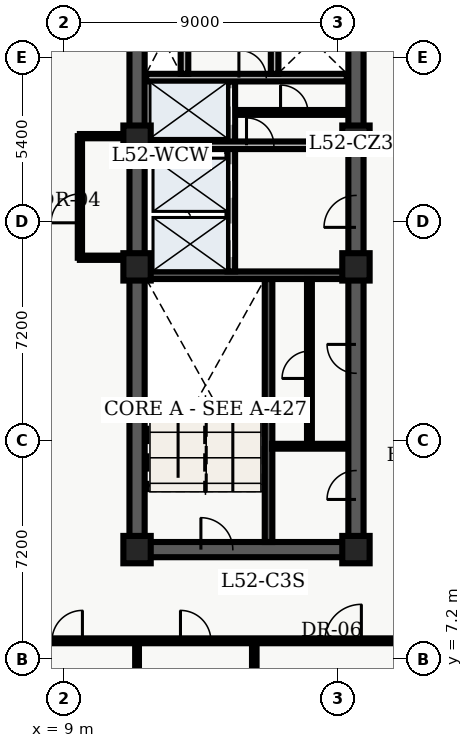
"""IFC4 building model, lengths in metres.
Left out: names, types, materials, properties, quantities, classifications, styles, units other than length and angle.
Written with IfcOpenShell. Run it as: python <this file> out.ifc"""

import sys

from ifc_helpers import new_model, entity, si_unit, converted_unit, direction, frame, origin_with_axes, origin_2d_with_axis, place, context, subcontext, project, spatial, polyline, rectangle, outline, extrude, element, fill, save


model = new_model("IFC4")
c1 = context("Model", 3, precision=1e-05, world=origin_with_axes(), true_north=direction((0.0, 1.0)))
c2 = subcontext(c1, "Body", "Model", "MODEL_VIEW")
j1 = project(units=[si_unit("LENGTHUNIT", "METRE"), converted_unit("PLANEANGLEUNIT", "DEGREE", entity("IfcPlaneAngleMeasure", 0.017), si_unit("PLANEANGLEUNIT", "RADIAN"), dimensions=[0, 0, 0, 0, 0, 0, 0])], contexts=[c1])
p1 = place(None, origin_with_axes())
s1 = spatial("IfcSite", under=j1, at=p1, CompositionType="ELEMENT")
p2 = place(p1, origin_with_axes())
s2 = spatial("IfcBuilding", under=s1, at=p2, CompositionType="ELEMENT")
p3 = place(p2, frame((0.0, 0.0, 212.1), z_axis=(0.0, 0.0, 1.0), x_axis=(1.0, 0.0, 0.0)))
s3 = spatial("IfcBuildingStorey", under=s2, at=p3, CompositionType="ELEMENT", Elevation=212.1)
p4 = place(p3, frame((11.4, 10.8, 0.0), z_axis=(0.0, 0.0, 1.0), x_axis=(0.0, 1.0, 0.0)))
e1 = element("IfcWall", 1, at=p4, inside=s3, PredefinedType="SHEAR", context=c2, shape_type="SweptSolid", body=[
    extrude(outline(polyline([(0.0, -0.25), (27.0, -0.25), (27.0, 0.25), (0.0, 0.25), (0.0, -0.25)])), origin_with_axes(), (0.0, 0.0, 1.0), 3.66),
])
p5 = place(p3, frame((11.4, 10.8, 0.0), z_axis=(0.0, 0.0, 1.0), x_axis=(1.0, 0.0, 0.0)))
e2 = element("IfcWall", 2, at=p5, inside=s3, PredefinedType="SHEAR", context=c2, shape_type="SweptSolid", body=[
    extrude(outline(polyline([(0.0, -0.25), (7.2, -0.25), (7.2, 0.25), (0.0, 0.25), (0.0, -0.25)])), origin_with_axes(), (0.0, 0.0, 1.0), 3.66),
])
p6 = place(p5, frame((2.625, 0.0, 0.0), z_axis=(0.0, 0.0, 1.0), x_axis=(1.0, 0.0, 0.0)))
e3 = element("IfcOpeningElement", 3, at=p6, cuts=e2, PredefinedType="OPENING", context=c2, shape_type="SweptSolid", body=[
    extrude(rectangle(XDim=1.05, YDim=0.52, at=origin_2d_with_axis()), origin_with_axes(), (0.0, 0.0, 1.0), 2.15),
])
p7 = place(p3, frame((18.6, 10.8, 0.0), z_axis=(0.0, 0.0, 1.0), x_axis=(0.0, 1.0, 0.0)))
e4 = element("IfcWall", 4, at=p7, inside=s3, PredefinedType="SHEAR", context=c2, shape_type="SweptSolid", body=[
    extrude(outline(polyline([(0.0, -0.25), (13.5, -0.25), (13.5, 0.25), (0.0, 0.25), (0.0, -0.25)])), origin_with_axes(), (0.0, 0.0, 1.0), 3.66),
])
p8 = place(p7, frame((11.125, 0.0, 0.0), z_axis=(0.0, 0.0, 1.0), x_axis=(1.0, 0.0, 0.0)))
e5 = element("IfcOpeningElement", 5, at=p8, cuts=e4, PredefinedType="OPENING", context=c2, shape_type="SweptSolid", body=[
    extrude(rectangle(XDim=1.05, YDim=0.52, at=origin_2d_with_axis()), origin_with_axes(), (0.0, 0.0, 1.0), 2.15),
])
p9 = place(p7, frame((2.125, 0.0, 0.0), z_axis=(0.0, 0.0, 1.0), x_axis=(1.0, 0.0, 0.0)))
e6 = element("IfcOpeningElement", 6, at=p9, cuts=e4, PredefinedType="OPENING", context=c2, shape_type="SweptSolid", body=[
    extrude(rectangle(XDim=0.95, YDim=0.52, at=origin_2d_with_axis()), origin_with_axes(), (0.0, 0.0, 1.0), 2.15),
])
p10 = place(p7, frame((6.275, 0.0, 0.0), z_axis=(0.0, 0.0, 1.0), x_axis=(1.0, 0.0, 0.0)))
e7 = element("IfcOpeningElement", 7, at=p10, cuts=e4, PredefinedType="OPENING", context=c2, shape_type="SweptSolid", body=[
    extrude(rectangle(XDim=0.95, YDim=0.52, at=origin_2d_with_axis()), origin_with_axes(), (0.0, 0.0, 1.0), 2.15),
])
p11 = place(p3, frame((18.6, 24.3, 0.0), z_axis=(0.0, 0.0, 1.0), x_axis=(0.0, 1.0, 0.0)))
e8 = element("IfcWall", 8, at=p11, inside=s3, PredefinedType="SHEAR", context=c2, shape_type="SweptSolid", body=[
    extrude(outline(polyline([(0.0, -0.25), (13.5, -0.25), (13.5, 0.25), (0.0, 0.25), (0.0, -0.25)])), origin_with_axes(), (0.0, 0.0, 1.0), 3.66),
])
p12 = place(p11, frame((5.65, 0.0, 0.0), z_axis=(0.0, 0.0, 1.0), x_axis=(1.0, 0.0, 0.0)))
e9 = element("IfcOpeningElement", 9, at=p12, cuts=e8, PredefinedType="OPENING", context=c2, shape_type="SweptSolid", body=[
    extrude(rectangle(XDim=1.1, YDim=0.52, at=origin_2d_with_axis()), origin_with_axes(), (0.0, 0.0, 1.0), 2.15),
])
p13 = place(p11, frame((7.75, 0.0, 0.0), z_axis=(0.0, 0.0, 1.0), x_axis=(1.0, 0.0, 0.0)))
e10 = element("IfcOpeningElement", 10, at=p13, cuts=e8, PredefinedType="OPENING", context=c2, shape_type="SweptSolid", body=[
    extrude(rectangle(XDim=1.1, YDim=0.52, at=origin_2d_with_axis()), origin_with_axes(), (0.0, 0.0, 1.0), 2.15),
])
p14 = place(p3, frame((15.725, 11.05, 0.0), z_axis=(0.0, 0.0, 1.0), x_axis=(0.0, 1.0, 0.0)))
e11 = element("IfcWall", 11, at=p14, inside=s3, PredefinedType="SHEAR", context=c2, shape_type="SweptSolid", body=[
    extrude(outline(polyline([(0.0, -0.125), (8.65, -0.125), (8.65, 0.125), (0.0, 0.125), (0.0, -0.125)])), origin_with_axes(), (0.0, 0.0, 1.0), 3.66),
])
p15 = place(p3, frame((11.65, 19.825, 0.0), z_axis=(0.0, 0.0, 1.0), x_axis=(1.0, 0.0, 0.0)))
e12 = element("IfcWall", 12, at=p15, inside=s3, PredefinedType="SHEAR", context=c2, shape_type="SweptSolid", body=[
    extrude(outline(polyline([(0.0, -0.125), (6.7, -0.125), (6.7, 0.125), (0.0, 0.125), (0.0, -0.125)])), origin_with_axes(), (0.0, 0.0, 1.0), 3.66),
])
p16 = place(p3, frame((14.5, 19.95, 0.0), z_axis=(0.0, 0.0, 1.0), x_axis=(0.0, 1.0, 0.0)))
e13 = element("IfcWall", 13, at=p16, inside=s3, PredefinedType="SOLIDWALL", context=c2, shape_type="SweptSolid", body=[
    extrude(outline(polyline([(0.0, -0.125), (6.25, -0.125), (6.25, 0.125), (0.0, 0.125), (0.0, -0.125)])), origin_with_axes(), (0.0, 0.0, 1.0), 2.7),
])
p17 = place(p16, frame((1.025, 0.0, 0.0), z_axis=(0.0, 0.0, 1.0), x_axis=(1.0, 0.0, 0.0)))
e14 = element("IfcOpeningElement", 14, at=p17, cuts=e13, PredefinedType="OPENING", context=c2, shape_type="SweptSolid", body=[
    extrude(rectangle(XDim=1.1, YDim=0.27, at=origin_2d_with_axis()), origin_with_axes(), (0.0, 0.0, 1.0), 2.15),
])
p18 = place(p16, frame((2.975, 0.0, 0.0), z_axis=(0.0, 0.0, 1.0), x_axis=(1.0, 0.0, 0.0)))
e15 = element("IfcOpeningElement", 15, at=p18, cuts=e13, PredefinedType="OPENING", context=c2, shape_type="SweptSolid", body=[
    extrude(rectangle(XDim=1.1, YDim=0.27, at=origin_2d_with_axis()), origin_with_axes(), (0.0, 0.0, 1.0), 2.15),
])
p19 = place(p16, frame((5.425, 0.0, 0.0), z_axis=(0.0, 0.0, 1.0), x_axis=(1.0, 0.0, 0.0)))
e16 = element("IfcOpeningElement", 16, at=p19, cuts=e13, PredefinedType="OPENING", context=c2, shape_type="SweptSolid", body=[
    extrude(rectangle(XDim=1.2, YDim=0.27, at=origin_2d_with_axis()), origin_with_axes(), (0.0, 0.0, 1.0), 2.15),
])
p20 = place(p3, frame((11.7, 24.1, 0.0), z_axis=(0.0, 0.0, 1.0), x_axis=(1.0, 0.0, 0.0)))
e17 = element("IfcWall", 17, at=p20, inside=s3, PredefinedType="SOLIDWALL", context=c2, shape_type="SweptSolid", body=[
    extrude(outline(polyline([(0.0, -0.125), (6.6, -0.125), (6.6, 0.125), (0.0, 0.125), (0.0, -0.125)])), origin_with_axes(), (0.0, 0.0, 1.0), 2.7),
])
p21 = place(p20, frame((3.75, 0.0, 0.0), z_axis=(0.0, 0.0, 1.0), x_axis=(1.0, 0.0, 0.0)))
e18 = element("IfcOpeningElement", 18, at=p21, cuts=e17, PredefinedType="OPENING", context=c2, shape_type="SweptSolid", body=[
    extrude(rectangle(XDim=0.9, YDim=0.27, at=origin_2d_with_axis()), origin_with_axes(), (0.0, 0.0, 1.0), 2.15),
])
p22 = place(p3, frame((11.7, 26.325, 0.0), z_axis=(0.0, 0.0, 1.0), x_axis=(1.0, 0.0, 0.0)))
e19 = element("IfcWall", 19, at=p22, inside=s3, PredefinedType="SOLIDWALL", context=c2, shape_type="SweptSolid", body=[
    extrude(outline(polyline([(0.0, -0.125), (6.6, -0.125), (6.6, 0.125), (0.0, 0.125), (0.0, -0.125)])), origin_with_axes(), (0.0, 0.0, 1.0), 2.7),
])
p23 = place(p22, frame((3.5, 0.0, 0.0), z_axis=(0.0, 0.0, 1.0), x_axis=(1.0, 0.0, 0.0)))
e20 = element("IfcOpeningElement", 20, at=p23, cuts=e19, PredefinedType="OPENING", context=c2, shape_type="SweptSolid", body=[
    extrude(rectangle(XDim=0.9, YDim=0.27, at=origin_2d_with_axis()), origin_with_axes(), (0.0, 0.0, 1.0), 2.15),
])
for number, where, z_axis, x_axis in (
    (21, (12.96, 26.45, 0.0), (0.0, 0.0, 1.0), (0.0, 1.0, 0.0)),
    (22, (15.925, 26.45, 0.0), (0.0, 0.0, 1.0), (0.0, 1.0, 0.0)),
):
    element("IfcWall", number, at=place(p3, frame(where, z_axis=z_axis, x_axis=x_axis)), inside=s3, PredefinedType="SOLIDWALL", context=c2, shape_type="SweptSolid", body=[
        extrude(outline(polyline([(0.0, -0.125), (2.2, -0.125), (2.2, 0.125), (0.0, 0.125), (0.0, -0.125)])), origin_with_axes(), (0.0, 0.0, 1.0), 2.7),
    ])
for number, where, z_axis, x_axis in (
    (23, (11.4, 10.8, 0.0), (0.0, 0.0, 1.0), (1.0, 0.0, 0.0)),
    (24, (11.4, 20.1, 0.0), (0.0, 0.0, 1.0), (1.0, 0.0, 0.0)),
    (25, (11.4, 24.3, 0.0), (0.0, 0.0, 1.0), (1.0, 0.0, 0.0)),
    (26, (18.6, 10.8, 0.0), (0.0, 0.0, 1.0), (1.0, 0.0, 0.0)),
    (27, (18.6, 20.1, 0.0), (0.0, 0.0, 1.0), (1.0, 0.0, 0.0)),
    (28, (18.6, 24.3, 0.0), (0.0, 0.0, 1.0), (1.0, 0.0, 0.0)),
):
    element("IfcColumn", number, at=place(p3, frame(where, z_axis=z_axis, x_axis=x_axis)), inside=s3, PredefinedType="COLUMN", context=c2, shape_type="SweptSolid", body=[
        extrude(rectangle(XDim=0.9, YDim=0.9, at=origin_2d_with_axis()), origin_with_axes(), (0.0, 0.0, 1.0), 3.9),
    ])
p24 = place(p3, frame((14.62, 25.18, 0.0), z_axis=(0.0, 0.0, 1.0), x_axis=(1.0, 0.0, 0.0)))
e29 = element("IfcWall", 29, at=p24, inside=s3, PredefinedType="PARTITIONING", context=c2, shape_type="SweptSolid", body=[
    extrude(outline(polyline([(0.0, -0.08), (3.68, -0.08), (3.68, 0.08), (0.0, 0.08), (0.0, -0.08)])), origin_with_axes(), (0.0, 0.0, 1.0), 2.7),
])
p25 = place(p24, frame((1.95, 0.0, 0.0), z_axis=(0.0, 0.0, 1.0), x_axis=(1.0, 0.0, 0.0)))
e30 = element("IfcOpeningElement", 30, at=p25, cuts=e29, PredefinedType="OPENING", context=c2, shape_type="SweptSolid", body=[
    extrude(rectangle(XDim=0.9, YDim=0.18, at=origin_2d_with_axis()), origin_with_axes(), (0.0, 0.0, 1.0), 2.15),
])
p26 = place(p3, frame((15.84, 14.2, 0.0), z_axis=(0.0, 0.0, 1.0), x_axis=(1.0, 0.0, 0.0)))
e31 = element("IfcWall", 31, at=p26, inside=s3, PredefinedType="PARTITIONING", context=c2, shape_type="SweptSolid", body=[
    extrude(outline(polyline([(0.0, -0.08), (2.46, -0.08), (2.46, 0.08), (0.0, 0.08), (0.0, -0.08)])), origin_with_axes(), (0.0, 0.0, 1.0), 2.7),
])
p27 = place(p3, frame((17.07, 14.28, 0.0), z_axis=(0.0, 0.0, 1.0), x_axis=(0.0, 1.0, 0.0)))
e32 = element("IfcWall", 32, at=p27, inside=s3, PredefinedType="PARTITIONING", context=c2, shape_type="SweptSolid", body=[
    extrude(outline(polyline([(0.0, -0.08), (5.42, -0.08), (5.42, 0.08), (0.0, 0.08), (0.0, -0.08)])), origin_with_axes(), (0.0, 0.0, 1.0), 2.7),
])
p28 = place(p27, frame((2.6, 0.0, 0.0), z_axis=(0.0, 0.0, 1.0), x_axis=(1.0, 0.0, 0.0)))
e33 = element("IfcOpeningElement", 33, at=p28, cuts=e32, PredefinedType="OPENING", context=c2, shape_type="SweptSolid", body=[
    extrude(rectangle(XDim=0.9, YDim=0.18, at=origin_2d_with_axis()), origin_with_axes(), (0.0, 0.0, 1.0), 2.15),
])
p29 = place(p3, frame((9.52, 20.4, 0.0), z_axis=(0.0, 0.0, 1.0), x_axis=(0.0, 1.0, 0.0)))
e34 = element("IfcWall", 34, at=p29, inside=s3, PredefinedType="PARTITIONING", context=c2, shape_type="SweptSolid", body=[
    extrude(outline(polyline([(0.0, -0.07), (4.0, -0.07), (4.0, 0.07), (0.0, 0.07), (0.0, -0.07)])), origin_with_axes(), (0.0, 0.0, 1.0), 2.7),
])
p30 = place(p29, frame((1.625, 0.0, 0.0), z_axis=(0.0, 0.0, 1.0), x_axis=(1.0, 0.0, 0.0)))
e35 = element("IfcOpeningElement", 35, at=p30, cuts=e34, PredefinedType="OPENING", context=c2, shape_type="SweptSolid", body=[
    extrude(rectangle(XDim=0.95, YDim=0.16, at=origin_2d_with_axis()), origin_with_axes(), (0.0, 0.0, 1.0), 2.15),
])
for number, where, z_axis, x_axis in (
    (36, (9.52, 20.4, 0.0), (0.0, 0.0, 1.0), (1.0, 0.0, 0.0)),
    (37, (9.52, 24.4, 0.0), (0.0, 0.0, 1.0), (1.0, 0.0, 0.0)),
):
    element("IfcWall", number, at=place(p3, frame(where, z_axis=z_axis, x_axis=x_axis)), inside=s3, PredefinedType="PARTITIONING", context=c2, shape_type="SweptSolid", body=[
        extrude(outline(polyline([(0.0, -0.07), (1.58, -0.07), (1.58, 0.07), (0.0, 0.07), (0.0, -0.07)])), origin_with_axes(), (0.0, 0.0, 1.0), 2.7),
    ])
p31 = place(p3, frame((2.6, 7.8, 0.0), z_axis=(0.0, 0.0, 1.0), x_axis=(1.0, 0.0, 0.0)))
e38 = element("IfcWall", 38, at=p31, inside=s3, PredefinedType="PARTITIONING", context=c2, shape_type="SweptSolid", body=[
    extrude(outline(polyline([(0.0, -0.08), (18.55, -0.08), (18.55, 0.08), (0.0, 0.08), (0.0, -0.08)])), origin_with_axes(), (0.0, 0.0, 1.0), 2.7),
])
p32 = place(p31, frame((1.817, 0.0, 0.0), z_axis=(0.0, 0.0, 1.0), x_axis=(1.0, 0.0, 0.0)))
e39 = element("IfcOpeningElement", 39, at=p32, cuts=e38, PredefinedType="OPENING", context=c2, shape_type="SweptSolid", body=[
    extrude(rectangle(XDim=1.0, YDim=0.18, at=origin_2d_with_axis()), origin_with_axes(), (0.0, 0.0, 1.0), 2.15),
])
p33 = place(p31, frame((6.503, 0.0, 0.0), z_axis=(0.0, 0.0, 1.0), x_axis=(1.0, 0.0, 0.0)))
e40 = element("IfcOpeningElement", 40, at=p33, cuts=e38, PredefinedType="OPENING", context=c2, shape_type="SweptSolid", body=[
    extrude(rectangle(XDim=1.0, YDim=0.18, at=origin_2d_with_axis()), origin_with_axes(), (0.0, 0.0, 1.0), 2.15),
])
p34 = place(p31, frame((10.728, 0.0, 0.0), z_axis=(0.0, 0.0, 1.0), x_axis=(1.0, 0.0, 0.0)))
e41 = element("IfcOpeningElement", 41, at=p34, cuts=e38, PredefinedType="OPENING", context=c2, shape_type="SweptSolid", body=[
    extrude(rectangle(XDim=1.0, YDim=0.18, at=origin_2d_with_axis()), origin_with_axes(), (0.0, 0.0, 1.0), 2.15),
])
p35 = place(p31, frame((15.578, 0.0, 0.0), z_axis=(0.0, 0.0, 1.0), x_axis=(1.0, 0.0, 0.0)))
e42 = element("IfcOpeningElement", 42, at=p35, cuts=e38, PredefinedType="OPENING", context=c2, shape_type="SweptSolid", body=[
    extrude(rectangle(XDim=1.2, YDim=0.18, at=origin_2d_with_axis()), origin_with_axes(), (0.0, 0.0, 1.0), 2.2),
])
p36 = place(p3, frame((11.4, 0.335, 0.0), z_axis=(0.0, 0.0, 1.0), x_axis=(0.0, 1.0, 0.0)))
e43 = element("IfcWall", 43, at=p36, inside=s3, PredefinedType="PARTITIONING", context=c2, shape_type="SweptSolid", body=[
    extrude(outline(polyline([(0.0, -0.062), (7.365, -0.062), (7.365, 0.062), (0.0, 0.062), (0.0, -0.062)])), origin_with_axes(), (0.0, 0.0, 1.0), 2.7),
])
p37 = place(p3, frame((15.256, 0.335, 0.0), z_axis=(0.0, 0.0, 1.0), x_axis=(0.0, 1.0, 0.0)))
e44 = element("IfcWall", 44, at=p37, inside=s3, PredefinedType="PARTITIONING", context=c2, shape_type="SweptSolid", body=[
    extrude(outline(polyline([(0.0, -0.075), (7.365, -0.075), (7.365, 0.075), (0.0, 0.075), (0.0, -0.075)])), origin_with_axes(), (0.0, 0.0, 1.0), 2.7),
])
p38 = place(p16, frame((1.025, 0.0, 0.0), z_axis=(0.0, 0.0, 1.0), x_axis=(1.0, 0.0, 0.0)))
e45 = element("IfcDoor", 45, at=p38, inside=s3, OperationType="SLIDING_TO_LEFT", PredefinedType="DOOR", context=c2, shape_type="SweptSolid", body=[
    extrude(rectangle(XDim=1.1, YDim=0.09, at=origin_2d_with_axis()), origin_with_axes(), (0.0, 0.0, 1.0), 2.15),
])
fill(e14, e45)
p39 = place(p16, frame((2.975, 0.0, 0.0), z_axis=(0.0, 0.0, 1.0), x_axis=(1.0, 0.0, 0.0)))
e46 = element("IfcDoor", 46, at=p39, inside=s3, OperationType="SLIDING_TO_RIGHT", PredefinedType="DOOR", context=c2, shape_type="SweptSolid", body=[
    extrude(rectangle(XDim=1.1, YDim=0.09, at=origin_2d_with_axis()), origin_with_axes(), (0.0, 0.0, 1.0), 2.15),
])
fill(e15, e46)
p40 = place(p16, frame((5.425, 0.0, 0.0), z_axis=(0.0, 0.0, 1.0), x_axis=(1.0, 0.0, 0.0)))
e47 = element("IfcDoor", 47, at=p40, inside=s3, OperationType="DOUBLE_DOOR_SLIDING", PredefinedType="DOOR", context=c2, shape_type="SweptSolid", body=[
    extrude(rectangle(XDim=1.2, YDim=0.09, at=origin_2d_with_axis()), origin_with_axes(), (0.0, 0.0, 1.0), 2.15),
])
fill(e16, e47)
p41 = place(p5, frame((2.625, 0.0, 0.0), z_axis=(0.0, 0.0, 1.0), x_axis=(1.0, 0.0, 0.0)))
e48 = element("IfcDoor", 48, at=p41, inside=s3, OperationType="SINGLE_SWING_LEFT", PredefinedType="DOOR", context=c2, shape_type="SweptSolid", body=[
    extrude(rectangle(XDim=1.05, YDim=0.09, at=origin_2d_with_axis()), origin_with_axes(), (0.0, 0.0, 1.0), 2.15),
])
fill(e3, e48)
p42 = place(p7, frame((11.125, 0.0, 0.0), z_axis=(0.0, 0.0, 1.0), x_axis=(1.0, 0.0, 0.0)))
e49 = element("IfcDoor", 49, at=p42, inside=s3, OperationType="SINGLE_SWING_LEFT", PredefinedType="DOOR", context=c2, shape_type="SweptSolid", body=[
    extrude(rectangle(XDim=1.05, YDim=0.09, at=origin_2d_with_axis()), origin_with_axes(), (0.0, 0.0, 1.0), 2.15),
])
fill(e5, e49)
p43 = place(p22, frame((3.5, 0.0, 0.0), z_axis=(0.0, 0.0, 1.0), x_axis=(1.0, 0.0, 0.0)))
e50 = element("IfcDoor", 50, at=p43, inside=s3, OperationType="SINGLE_SWING_LEFT", PredefinedType="DOOR", context=c2, shape_type="SweptSolid", body=[
    extrude(rectangle(XDim=0.9, YDim=0.09, at=origin_2d_with_axis()), origin_with_axes(), (0.0, 0.0, 1.0), 2.15),
])
fill(e20, e50)
p44 = place(p20, frame((3.75, 0.0, 0.0), z_axis=(0.0, 0.0, 1.0), x_axis=(1.0, 0.0, 0.0)))
e51 = element("IfcDoor", 51, at=p44, inside=s3, OperationType="SINGLE_SWING_LEFT", PredefinedType="DOOR", context=c2, shape_type="SweptSolid", body=[
    extrude(rectangle(XDim=0.9, YDim=0.09, at=origin_2d_with_axis()), origin_with_axes(), (0.0, 0.0, 1.0), 2.15),
])
fill(e18, e51)
p45 = place(p24, frame((1.95, 0.0, 0.0), z_axis=(0.0, 0.0, 1.0), x_axis=(1.0, 0.0, 0.0)))
e52 = element("IfcDoor", 52, at=p45, inside=s3, OperationType="SINGLE_SWING_LEFT", PredefinedType="DOOR", context=c2, shape_type="SweptSolid", body=[
    extrude(rectangle(XDim=0.9, YDim=0.09, at=origin_2d_with_axis()), origin_with_axes(), (0.0, 0.0, 1.0), 2.15),
])
fill(e30, e52)
p46 = place(p7, frame((2.125, 0.0, 0.0), z_axis=(0.0, 0.0, 1.0), x_axis=(1.0, 0.0, 0.0)))
e53 = element("IfcDoor", 53, at=p46, inside=s3, OperationType="SINGLE_SWING_LEFT", PredefinedType="DOOR", context=c2, shape_type="SweptSolid", body=[
    extrude(rectangle(XDim=0.95, YDim=0.09, at=origin_2d_with_axis()), origin_with_axes(), (0.0, 0.0, 1.0), 2.15),
])
fill(e6, e53)
p47 = place(p27, frame((2.6, 0.0, 0.0), z_axis=(0.0, 0.0, 1.0), x_axis=(1.0, 0.0, 0.0)))
e54 = element("IfcDoor", 54, at=p47, inside=s3, OperationType="SINGLE_SWING_LEFT", PredefinedType="DOOR", context=c2, shape_type="SweptSolid", body=[
    extrude(rectangle(XDim=0.9, YDim=0.09, at=origin_2d_with_axis()), origin_with_axes(), (0.0, 0.0, 1.0), 2.15),
])
fill(e33, e54)
p48 = place(p7, frame((6.275, 0.0, 0.0), z_axis=(0.0, 0.0, 1.0), x_axis=(1.0, 0.0, 0.0)))
e55 = element("IfcDoor", 55, at=p48, inside=s3, OperationType="SINGLE_SWING_RIGHT", PredefinedType="DOOR", context=c2, shape_type="SweptSolid", body=[
    extrude(rectangle(XDim=0.95, YDim=0.09, at=origin_2d_with_axis()), origin_with_axes(), (0.0, 0.0, 1.0), 2.15),
])
fill(e7, e55)
p49 = place(p29, frame((1.625, 0.0, 0.0), z_axis=(0.0, 0.0, 1.0), x_axis=(1.0, 0.0, 0.0)))
e56 = element("IfcDoor", 56, at=p49, inside=s3, OperationType="SINGLE_SWING_LEFT", PredefinedType="DOOR", context=c2, shape_type="SweptSolid", body=[
    extrude(rectangle(XDim=0.95, YDim=0.084, at=origin_2d_with_axis()), origin_with_axes(), (0.0, 0.0, 1.0), 2.15),
])
fill(e35, e56)
p50 = place(p31, frame((6.503, 0.0, 0.0), z_axis=(0.0, 0.0, 1.0), x_axis=(1.0, 0.0, 0.0)))
e57 = element("IfcDoor", 57, at=p50, inside=s3, OperationType="SINGLE_SWING_RIGHT", PredefinedType="DOOR", context=c2, shape_type="SweptSolid", body=[
    extrude(rectangle(XDim=1.0, YDim=0.09, at=origin_2d_with_axis()), origin_with_axes(), (0.0, 0.0, 1.0), 2.15),
])
fill(e40, e57)
p51 = place(p31, frame((10.728, 0.0, 0.0), z_axis=(0.0, 0.0, 1.0), x_axis=(1.0, 0.0, 0.0)))
e58 = element("IfcDoor", 58, at=p51, inside=s3, OperationType="SINGLE_SWING_LEFT", PredefinedType="DOOR", context=c2, shape_type="SweptSolid", body=[
    extrude(rectangle(XDim=1.0, YDim=0.09, at=origin_2d_with_axis()), origin_with_axes(), (0.0, 0.0, 1.0), 2.15),
])
fill(e41, e58)
p52 = place(p31, frame((15.578, 0.0, 0.0), z_axis=(0.0, 0.0, 1.0), x_axis=(1.0, 0.0, 0.0)))
e59 = element("IfcDoor", 59, at=p52, inside=s3, OperationType="SINGLE_SWING_RIGHT", PredefinedType="DOOR", context=c2, shape_type="SweptSolid", body=[
    extrude(rectangle(XDim=1.2, YDim=0.09, at=origin_2d_with_axis()), origin_with_axes(), (0.0, 0.0, 1.0), 2.2),
])
fill(e42, e59)
save(model, sys.argv[1])
